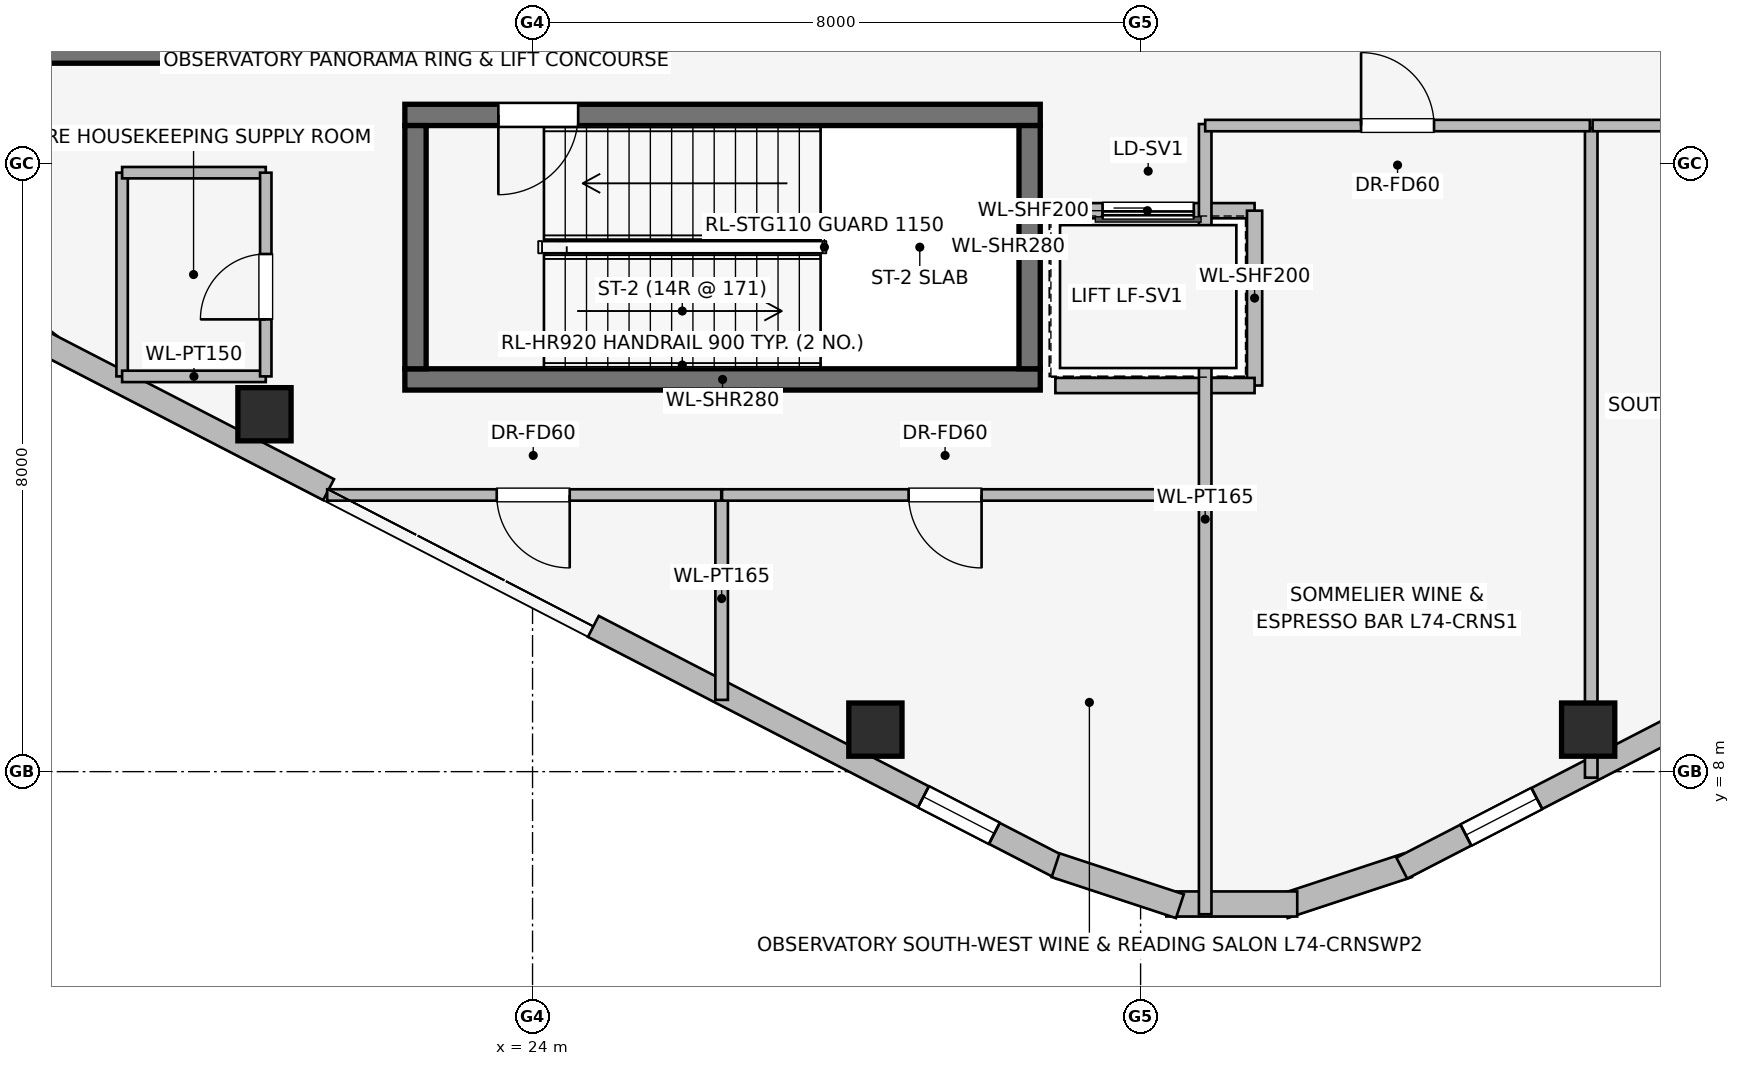
"""IFC4 building model, lengths in metres.
Left out: names, types, materials, properties, quantities, classifications, styles, units other than length and angle.
Written with IfcOpenShell. Run it as: python <this file> out.ifc"""

import sys

from ifc_helpers import new_model, si_unit, direction, frame, frame_2d, origin, origin_2d, place, context, subcontext, project, spatial, rectangle, extrude, element, fill, save


model = new_model("IFC4")
c1 = context("Model", 3, precision=1e-05, world=origin(), true_north=direction((0.0, 1.0)))
c2 = subcontext(c1, "Body", "Model", "MODEL_VIEW")
j1 = project(units=[si_unit("LENGTHUNIT", "METRE"), si_unit("PLANEANGLEUNIT", "RADIAN")], contexts=[c1])
p1 = place(None, origin())
s1 = spatial("IfcSite", under=j1, at=p1, CompositionType="ELEMENT")
p2 = place(p1, origin())
s2 = spatial("IfcBuilding", under=s1, at=p2, CompositionType="ELEMENT")
p3 = place(p2, frame((0.0, 0.0, 270.3)))
s3 = spatial("IfcBuildingStorey", under=s2, at=p3, CompositionType="ELEMENT", Elevation=270.3)
p4 = place(p3, frame((16.87, 17.46, 0.0), z_axis=(0.0, 0.0, 1.0), x_axis=(1.0, 0.0, 0.0)))
e1 = element("IfcWall", 1, at=p4, inside=s3, PredefinedType="SHEAR", context=c2, shape_type="SweptSolid", body=[
    extrude(rectangle(XDim=3.76, YDim=0.28, at=frame_2d((1.88, 0.0))), origin(), (0.0, 0.0, 1.0), 4.8),
])
p5 = place(p3, frame((22.32, 13.16, 0.0), z_axis=(0.0, 0.0, 1.0), x_axis=(1.0, 0.0, 0.0)))
e2 = element("IfcWall", 2, at=p5, inside=s3, PredefinedType="SHEAR", context=c2, shape_type="SweptSolid", body=[
    extrude(rectangle(XDim=8.36, YDim=0.28, at=frame_2d((4.18, 0.0))), origin(), (0.0, 0.0, 1.0), 4.8),
])
p6 = place(p3, frame((30.68, 16.64, 0.0), z_axis=(0.0, 0.0, 1.0), x_axis=(-1.0, 0.0, 0.0)))
e3 = element("IfcWall", 3, at=p6, inside=s3, PredefinedType="SHEAR", context=c2, shape_type="SweptSolid", body=[
    extrude(rectangle(XDim=8.36, YDim=0.28, at=frame_2d((4.18, 0.0))), origin(), (0.0, 0.0, 1.0), 4.8),
])
p7 = place(p6, frame((6.08, 0.0, 0.0)))
e4 = element("IfcOpeningElement", 4, at=p7, cuts=e3, PredefinedType="OPENING", context=c2, shape_type="SweptSolid", body=[
    extrude(rectangle(XDim=1.05, YDim=2.0, at=frame_2d((0.525, 1.0))), frame((0.0, 0.15, 0.0), z_axis=(0.0, -1.0, 0.0), x_axis=(1.0, 0.0, 0.0)), (0.0, 0.0, 1.0), 0.3),
])
for number, where, z_axis, x_axis in (
    (5, (22.46, 16.5, 0.0), (0.0, 0.0, 1.0), (0.0, -1.0, 0.0)),
    (6, (30.54, 13.3, 0.0), (0.0, 0.0, 1.0), (0.0, 1.0, 0.0)),
):
    element("IfcWall", number, at=place(p3, frame(where, z_axis=z_axis, x_axis=x_axis)), inside=s3, PredefinedType="SHEAR", context=c2, shape_type="SweptSolid", body=[
        extrude(rectangle(XDim=3.2, YDim=0.28, at=frame_2d((1.6, 0.0))), origin(), (0.0, 0.0, 1.0), 4.8),
    ])
for number, where, z_axis, x_axis in (
    (7, (20.473, 12.702, 0.0), (0.0, 0.0, 1.0), (1.0, 0.0, 0.0)),
    (8, (28.511, 8.553, 0.0), (0.0, 0.0, 1.0), (1.0, 0.0, 0.0)),
    (9, (37.889, 8.553, 0.0), (0.0, 0.0, 1.0), (1.0, 0.0, 0.0)),
):
    element("IfcColumn", number, at=place(p3, frame(where, z_axis=z_axis, x_axis=x_axis)), inside=s3, PredefinedType="COLUMN", context=c2, shape_type="SweptSolid", body=[
        extrude(rectangle(XDim=0.7, YDim=0.7, at=origin_2d()), origin(), (0.0, 0.0, 1.0), 4.8),
    ])
p8 = place(p3, frame((17.647, 13.599, 0.0), z_axis=(0.0, 0.0, 1.0), x_axis=(-0.790691856293, 0.61221433207, 0.0)))
e10 = element("IfcWall", 10, at=p8, inside=s3, PredefinedType="STANDARD", context=c2, shape_type="SweptSolid", body=[
    extrude(rectangle(XDim=1.676, YDim=0.33, at=frame_2d((0.838, 0.0))), origin(), (0.0, 0.0, 1.0), 4.49),
])
p9 = place(p3, frame((30.963, 6.73, 0.0), z_axis=(0.0, 0.0, 1.0), x_axis=(-0.888615566095, 0.458652783371, 0.0)))
e11 = element("IfcWall", 11, at=p9, inside=s3, PredefinedType="STANDARD", context=c2, shape_type="SweptSolid", body=[
    extrude(rectangle(XDim=6.935, YDim=0.31, at=frame_2d((3.468, 0.0))), origin(), (0.0, 0.0, 1.0), 4.49),
])
p10 = place(p9, frame((0.998, 0.0, 0.75)))
e12 = element("IfcOpeningElement", 12, at=p10, cuts=e11, PredefinedType="OPENING", context=c2, shape_type="SweptSolid", body=[
    extrude(rectangle(XDim=1.05, YDim=1.4, at=frame_2d((0.525, 0.7))), frame((0.0, 0.165, 0.0), z_axis=(0.0, -1.0, 0.0), x_axis=(1.0, 0.0, 0.0)), (0.0, 0.0, 1.0), 0.33),
])
p11 = place(p3, frame((21.317, 11.71, 0.0), z_axis=(0.0, 0.0, 1.0), x_axis=(-0.888616094641, 0.45865175934, 0.0)))
e13 = element("IfcWall", 13, at=p11, inside=s3, PredefinedType="STANDARD", context=c2, shape_type="SweptSolid", body=[
    extrude(rectangle(XDim=4.221, YDim=0.31, at=frame_2d((2.111, 0.0))), origin(), (0.0, 0.0, 1.0), 4.49),
])
p12 = place(p3, frame((35.518, 6.769, 0.0), z_axis=(0.0, 0.0, 1.0), x_axis=(-0.949713440491, -0.313120393699, 0.0)))
e14 = element("IfcWall", 14, at=p12, inside=s3, PredefinedType="STANDARD", context=c2, shape_type="SweptSolid", body=[
    extrude(rectangle(XDim=1.722, YDim=0.33, at=frame_2d((0.861, 0.0))), origin(), (0.0, 0.0, 1.0), 4.49),
])
p13 = place(p3, frame((34.061, 6.259, 0.0), z_axis=(0.0, 0.0, 1.0), x_axis=(-1.0, 0.0, 0.0)))
e15 = element("IfcWall", 15, at=p13, inside=s3, PredefinedType="STANDARD", context=c2, shape_type="SweptSolid", body=[
    extrude(rectangle(XDim=1.722, YDim=0.33, at=frame_2d((0.861, 0.0))), origin(), (0.0, 0.0, 1.0), 4.49),
])
p14 = place(p3, frame((32.517, 6.23, 0.0), z_axis=(0.0, 0.0, 1.0), x_axis=(-0.949713440491, 0.313120393699, 0.0)))
e16 = element("IfcWall", 16, at=p14, inside=s3, PredefinedType="STANDARD", context=c2, shape_type="SweptSolid", body=[
    extrude(rectangle(XDim=1.722, YDim=0.33, at=frame_2d((0.861, 0.0))), origin(), (0.0, 0.0, 1.0), 4.49),
])
p15 = place(p3, frame((39.188, 8.666, 0.0), z_axis=(0.0, 0.0, 1.0), x_axis=(-0.888616094641, -0.45865175934, 0.0)))
e17 = element("IfcWall", 17, at=p15, inside=s3, PredefinedType="STANDARD", context=c2, shape_type="SweptSolid", body=[
    extrude(rectangle(XDim=4.221, YDim=0.31, at=frame_2d((2.111, 0.0))), origin(), (0.0, 0.0, 1.0), 4.49),
])
p16 = place(p15, frame((2.222, 0.0, 0.75)))
e18 = element("IfcOpeningElement", 18, at=p16, cuts=e17, PredefinedType="OPENING", context=c2, shape_type="SweptSolid", body=[
    extrude(rectangle(XDim=1.05, YDim=1.4, at=frame_2d((0.525, 0.7))), frame((0.0, 0.165, 0.0), z_axis=(0.0, -1.0, 0.0), x_axis=(1.0, 0.0, 0.0)), (0.0, 0.0, 1.0), 0.33),
])
p17 = place(p3, frame((33.5, 15.38, 0.0), z_axis=(0.0, 0.0, 1.0), x_axis=(-1.0, 0.0, 0.0)))
e19 = element("IfcWall", 19, at=p17, inside=s3, PredefinedType="PARTITIONING", context=c2, shape_type="SweptSolid", body=[
    extrude(rectangle(XDim=2.82, YDim=0.2, at=frame_2d((1.41, 0.0))), origin(), (0.0, 0.0, 1.0), 4.49),
])
p18 = place(p17, frame((0.8, 0.0, 0.0)))
e20 = element("IfcOpeningElement", 20, at=p18, cuts=e19, PredefinedType="OPENING", context=c2, shape_type="SweptSolid", body=[
    extrude(rectangle(XDim=1.2, YDim=2.2, at=frame_2d((0.6, 1.1))), frame((0.0, 0.11, 0.0), z_axis=(0.0, -1.0, 0.0), x_axis=(1.0, 0.0, 0.0)), (0.0, 0.0, 1.0), 0.22),
])
p19 = place(p3, frame((33.5, 13.08, 0.0), z_axis=(0.0, 0.0, 1.0), x_axis=(0.0, 1.0, 0.0)))
e21 = element("IfcWall", 21, at=p19, inside=s3, PredefinedType="PARTITIONING", context=c2, shape_type="SweptSolid", body=[
    extrude(rectangle(XDim=2.3, YDim=0.2, at=frame_2d((1.15, 0.0))), origin(), (0.0, 0.0, 1.0), 4.49),
])
p20 = place(p3, frame((30.879, 13.08, 0.0), z_axis=(0.0, 0.0, 1.0), x_axis=(1.0, 0.0, 0.0)))
e22 = element("IfcWall", 22, at=p20, inside=s3, PredefinedType="PARTITIONING", context=c2, shape_type="SweptSolid", body=[
    extrude(rectangle(XDim=2.621, YDim=0.2, at=frame_2d((1.311, 0.0))), origin(), (0.0, 0.0, 1.0), 4.49),
])
p21 = place(p3, frame((18.6, 15.88, 0.0), z_axis=(0.0, 0.0, 1.0), x_axis=(0.0, -1.0, 0.0)))
e23 = element("IfcWall", 23, at=p21, inside=s3, PredefinedType="PARTITIONING", context=c2, shape_type="SweptSolid", body=[
    extrude(rectangle(XDim=2.68, YDim=0.15, at=frame_2d((1.34, 0.0))), origin(), (0.0, 0.0, 1.0), 4.49),
])
for number, where, z_axis, x_axis in (
    (24, (18.6, 13.2, 0.0), (0.0, 0.0, 1.0), (1.0, 0.0, 0.0)),
    (25, (18.6, 15.88, 0.0), (0.0, 0.0, 1.0), (1.0, 0.0, 0.0)),
):
    element("IfcWall", number, at=place(p3, frame(where, z_axis=z_axis, x_axis=x_axis)), inside=s3, PredefinedType="PARTITIONING", context=c2, shape_type="SweptSolid", body=[
        extrude(rectangle(XDim=1.89, YDim=0.15, at=frame_2d((0.945, 0.0))), origin(), (0.0, 0.0, 1.0), 4.49),
    ])
p22 = place(p3, frame((20.49, 13.2, 0.0), z_axis=(0.0, 0.0, 1.0), x_axis=(0.0, 1.0, 0.0)))
e26 = element("IfcWall", 26, at=p22, inside=s3, PredefinedType="PARTITIONING", context=c2, shape_type="SweptSolid", body=[
    extrude(rectangle(XDim=2.68, YDim=0.15, at=frame_2d((1.34, 0.0))), origin(), (0.0, 0.0, 1.0), 4.49),
])
p23 = place(p22, frame((0.75, 0.0, 0.0)))
e27 = element("IfcOpeningElement", 27, at=p23, cuts=e26, PredefinedType="OPENING", context=c2, shape_type="SweptSolid", body=[
    extrude(rectangle(XDim=0.86, YDim=2.0, at=frame_2d((0.43, 1.0))), frame((0.0, 0.085, 0.0), z_axis=(0.0, -1.0, 0.0), x_axis=(1.0, 0.0, 0.0)), (0.0, 0.0, 1.0), 0.17),
])
p24 = place(p3, frame((32.85, 6.124, 0.0), z_axis=(0.0, 0.0, 1.0), x_axis=(0.0, 1.0, 0.0)))
e28 = element("IfcWall", 28, at=p24, inside=s3, PredefinedType="PARTITIONING", context=c2, shape_type="SweptSolid", body=[
    extrude(rectangle(XDim=10.396, YDim=0.165, at=frame_2d((5.198, 0.0))), origin(), (0.0, 0.0, 1.0), 4.49),
])
p25 = place(p3, frame((26.488, 8.944, 0.0), z_axis=(0.0, 0.0, 1.0), x_axis=(0.0, 1.0, 0.0)))
e29 = element("IfcWall", 29, at=p25, inside=s3, PredefinedType="PARTITIONING", context=c2, shape_type="SweptSolid", body=[
    extrude(rectangle(XDim=2.666, YDim=0.165, at=frame_2d((1.333, 0.0))), origin(), (0.0, 0.0, 1.0), 4.49),
])
p26 = place(p3, frame((26.483, 11.64, 0.0), z_axis=(0.0, 0.0, 1.0), x_axis=(-1.0, 0.0, 0.0)))
e30 = element("IfcWall", 30, at=p26, inside=s3, PredefinedType="PARTITIONING", context=c2, shape_type="SweptSolid", body=[
    extrude(rectangle(XDim=5.185, YDim=0.15, at=frame_2d((2.592, 0.0))), origin(), (0.0, 0.0, 1.0), 4.49),
])
p27 = place(p26, frame((1.994, 0.0, 0.0)))
e31 = element("IfcOpeningElement", 31, at=p27, cuts=e30, PredefinedType="OPENING", context=c2, shape_type="SweptSolid", body=[
    extrude(rectangle(XDim=0.96, YDim=2.0, at=frame_2d((0.48, 1.0))), frame((0.0, 0.085, 0.0), z_axis=(0.0, -1.0, 0.0), x_axis=(1.0, 0.0, 0.0)), (0.0, 0.0, 1.0), 0.17),
])
p28 = place(p3, frame((32.773, 11.64, 0.0), z_axis=(0.0, 0.0, 1.0), x_axis=(-1.0, 0.0, 0.0)))
e32 = element("IfcWall", 32, at=p28, inside=s3, PredefinedType="PARTITIONING", context=c2, shape_type="SweptSolid", body=[
    extrude(rectangle(XDim=6.28, YDim=0.15, at=frame_2d((3.14, 0.0))), origin(), (0.0, 0.0, 1.0), 4.49),
])
p29 = place(p28, frame((2.865, 0.0, 0.0)))
e33 = element("IfcOpeningElement", 33, at=p29, cuts=e32, PredefinedType="OPENING", context=c2, shape_type="SweptSolid", body=[
    extrude(rectangle(XDim=0.96, YDim=2.0, at=frame_2d((0.48, 1.0))), frame((0.0, 0.085, 0.0), z_axis=(0.0, -1.0, 0.0), x_axis=(1.0, 0.0, 0.0)), (0.0, 0.0, 1.0), 0.17),
])
p30 = place(p3, frame((37.929, 7.921, 0.0), z_axis=(0.0, 0.0, 1.0), x_axis=(0.0, 1.0, 0.0)))
e34 = element("IfcWall", 34, at=p30, inside=s3, PredefinedType="PARTITIONING", context=c2, shape_type="SweptSolid", body=[
    extrude(rectangle(XDim=8.549, YDim=0.165, at=frame_2d((4.274, 0.0))), origin(), (0.0, 0.0, 1.0), 3.879),
])
p31 = place(p3, frame((32.85, 16.5, 0.0), z_axis=(0.0, 0.0, 1.0), x_axis=(1.0, 0.0, 0.0)))
e35 = element("IfcWall", 35, at=p31, inside=s3, PredefinedType="PARTITIONING", context=c2, shape_type="SweptSolid", body=[
    extrude(rectangle(XDim=5.061, YDim=0.15, at=frame_2d((2.53, 0.0))), origin(), (0.0, 0.0, 1.0), 4.49),
])
p32 = place(p31, frame((2.051, 0.0, 0.0)))
e36 = element("IfcOpeningElement", 36, at=p32, cuts=e35, PredefinedType="OPENING", context=c2, shape_type="SweptSolid", body=[
    extrude(rectangle(XDim=0.96, YDim=2.0, at=frame_2d((0.48, 1.0))), frame((0.0, 0.085, 0.0), z_axis=(0.0, -1.0, 0.0), x_axis=(1.0, 0.0, 0.0)), (0.0, 0.0, 1.0), 0.17),
])
p33 = place(p3, frame((37.947, 16.5, 0.0), z_axis=(0.0, 0.0, 1.0), x_axis=(1.0, 0.0, 0.0)))
e37 = element("IfcWall", 37, at=p33, inside=s3, PredefinedType="PARTITIONING", context=c2, shape_type="SweptSolid", body=[
    extrude(rectangle(XDim=3.453, YDim=0.15, at=frame_2d((1.727, 0.0))), origin(), (0.0, 0.0, 1.0), 4.49),
])
p34 = place(p33, frame((1.247, 0.0, 0.0)))
e38 = element("IfcOpeningElement", 38, at=p34, cuts=e37, PredefinedType="OPENING", context=c2, shape_type="SweptSolid", body=[
    extrude(rectangle(XDim=0.96, YDim=2.0, at=frame_2d((0.48, 1.0))), frame((0.0, 0.085, 0.0), z_axis=(0.0, -1.0, 0.0), x_axis=(1.0, 0.0, 0.0)), (0.0, 0.0, 1.0), 0.17),
])
p35 = place(p10, origin())
e39 = element("IfcWindow", 39, at=p35, inside=s3, PartitioningType="SINGLE_PANEL", PredefinedType="WINDOW", context=c2, shape_type="SweptSolid", body=[
    extrude(rectangle(XDim=1.05, YDim=1.4, at=frame_2d((0.525, 0.7))), frame((0.0, 0.03, 0.0), z_axis=(0.0, -1.0, 0.0), x_axis=(1.0, 0.0, 0.0)), (0.0, 0.0, 1.0), 0.06),
])
fill(e12, e39)
p36 = place(p16, origin())
e40 = element("IfcWindow", 40, at=p36, inside=s3, PartitioningType="SINGLE_PANEL", PredefinedType="WINDOW", context=c2, shape_type="SweptSolid", body=[
    extrude(rectangle(XDim=1.05, YDim=1.4, at=frame_2d((0.525, 0.7))), frame((0.0, 0.03, 0.0), z_axis=(0.0, -1.0, 0.0), x_axis=(1.0, 0.0, 0.0)), (0.0, 0.0, 1.0), 0.06),
])
fill(e18, e40)
p37 = place(p7, origin())
e41 = element("IfcDoor", 41, at=p37, inside=s3, OperationType="SINGLE_SWING_RIGHT", PredefinedType="DOOR", context=c2, shape_type="SweptSolid", body=[
    extrude(rectangle(XDim=1.05, YDim=2.0, at=frame_2d((0.525, 1.0))), frame((0.0, 0.025, 0.0), z_axis=(0.0, -1.0, 0.0), x_axis=(1.0, 0.0, 0.0)), (0.0, 0.0, 1.0), 0.05),
])
fill(e4, e41)
p38 = place(p18, origin())
e42 = element("IfcDoor", 42, at=p38, inside=s3, OperationType="SLIDING_TO_RIGHT", PredefinedType="DOOR", context=c2, shape_type="SweptSolid", body=[
    extrude(rectangle(XDim=1.2, YDim=2.2, at=frame_2d((0.6, 1.1))), frame((0.0, 0.025, 0.0), z_axis=(0.0, -1.0, 0.0), x_axis=(1.0, 0.0, 0.0)), (0.0, 0.0, 1.0), 0.05),
])
fill(e20, e42)
p39 = place(p23, origin())
e43 = element("IfcDoor", 43, at=p39, inside=s3, OperationType="SINGLE_SWING_LEFT", PredefinedType="DOOR", context=c2, shape_type="SweptSolid", body=[
    extrude(rectangle(XDim=0.86, YDim=2.0, at=frame_2d((0.43, 1.0))), frame((0.0, 0.025, 0.0), z_axis=(0.0, -1.0, 0.0), x_axis=(1.0, 0.0, 0.0)), (0.0, 0.0, 1.0), 0.05),
])
fill(e27, e43)
p40 = place(p27, origin())
e44 = element("IfcDoor", 44, at=p40, inside=s3, OperationType="SINGLE_SWING_LEFT", PredefinedType="DOOR", context=c2, shape_type="SweptSolid", body=[
    extrude(rectangle(XDim=0.96, YDim=2.0, at=frame_2d((0.48, 1.0))), frame((0.0, 0.025, 0.0), z_axis=(0.0, -1.0, 0.0), x_axis=(1.0, 0.0, 0.0)), (0.0, 0.0, 1.0), 0.05),
])
fill(e31, e44)
p41 = place(p29, origin())
e45 = element("IfcDoor", 45, at=p41, inside=s3, OperationType="SINGLE_SWING_LEFT", PredefinedType="DOOR", context=c2, shape_type="SweptSolid", body=[
    extrude(rectangle(XDim=0.96, YDim=2.0, at=frame_2d((0.48, 1.0))), frame((0.0, 0.025, 0.0), z_axis=(0.0, -1.0, 0.0), x_axis=(1.0, 0.0, 0.0)), (0.0, 0.0, 1.0), 0.05),
])
fill(e33, e45)
p42 = place(p32, origin())
e46 = element("IfcDoor", 46, at=p42, inside=s3, OperationType="SINGLE_SWING_LEFT", PredefinedType="DOOR", context=c2, shape_type="SweptSolid", body=[
    extrude(rectangle(XDim=0.96, YDim=2.0, at=frame_2d((0.48, 1.0))), frame((0.0, 0.025, 0.0), z_axis=(0.0, -1.0, 0.0), x_axis=(1.0, 0.0, 0.0)), (0.0, 0.0, 1.0), 0.05),
])
fill(e36, e46)
save(model, sys.argv[1])
